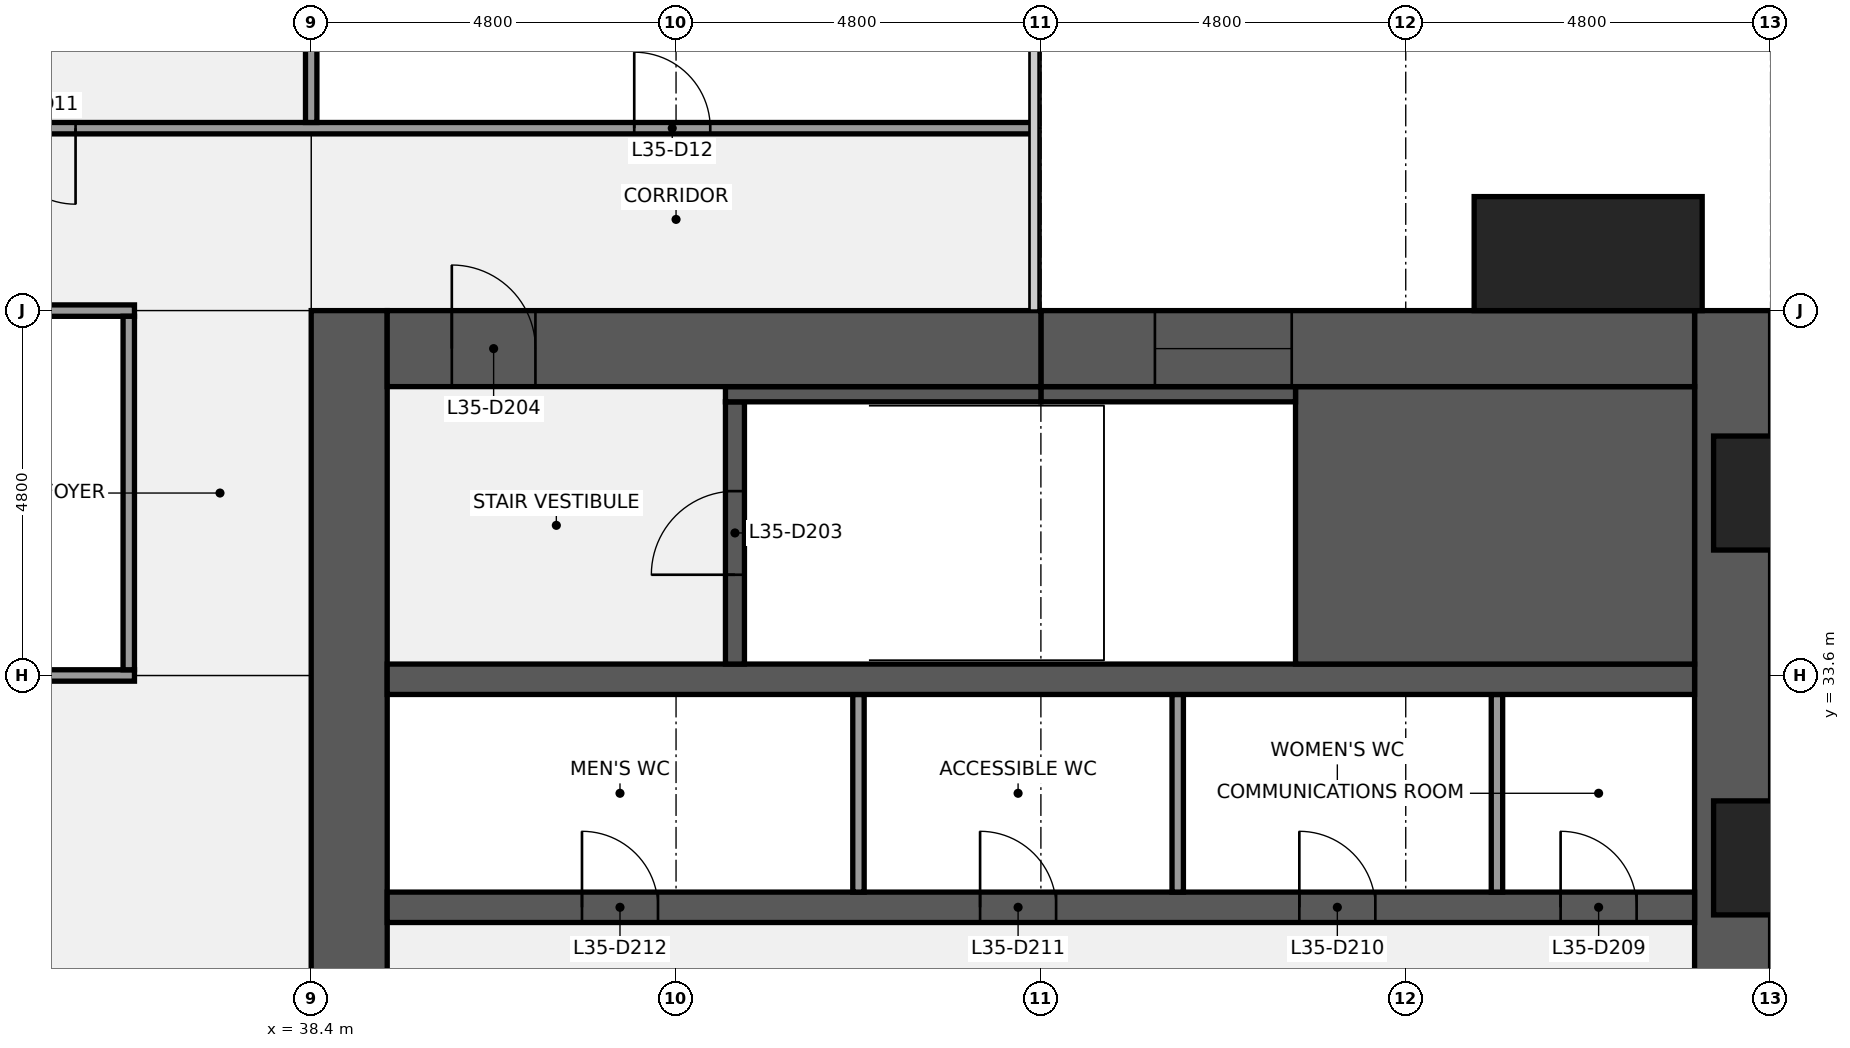
"""IFC4 building model, lengths in metres.
Left out: names, types, materials, properties, quantities, classifications, styles, units other than length and angle.
Written with IfcOpenShell. Run it as: python <this file> out.ifc"""

import sys

from ifc_helpers import new_model, si_unit, direction, frame, frame_2d, origin, origin_2d, place, context, subcontext, project, spatial, rectangle, extrude, element, fill, save


model = new_model("IFC4")
c1 = context("Model", 3, precision=1e-05, world=origin(), true_north=direction((0.0, 1.0)))
c2 = subcontext(c1, "Body", "Model", "MODEL_VIEW")
j1 = project(units=[si_unit("LENGTHUNIT", "METRE"), si_unit("PLANEANGLEUNIT", "RADIAN")], contexts=[c1])
p1 = place(None, origin())
s1 = spatial("IfcSite", under=j1, at=p1, CompositionType="ELEMENT")
p2 = place(p1, origin())
s2 = spatial("IfcBuilding", under=s1, at=p2, CompositionType="ELEMENT")
p3 = place(p2, frame((0.0, 0.0, 160.1)))
s3 = spatial("IfcBuildingStorey", under=s2, at=p3, CompositionType="ELEMENT", Elevation=160.1)
p4 = place(p3, frame((57.1, 38.4, 0.0), z_axis=(0.0, 0.0, 1.0), x_axis=(0.0, -1.0, 0.0)))
e1 = element("IfcWall", 1, at=p4, inside=s3, PredefinedType="SHEAR", context=c2, shape_type="SweptSolid", body=[
    extrude(rectangle(XDim=28.8, YDim=1.0, at=frame_2d((14.4, 0.0))), origin(), (0.0, 0.0, 1.0), 3.84),
])
p5 = place(p4, frame((18.45, 0.0, 0.9)))
e2 = element("IfcOpeningElement", 2, at=p5, cuts=e1, PredefinedType="OPENING", context=c2, shape_type="SweptSolid", body=[
    extrude(rectangle(XDim=1.5, YDim=1.5, at=frame_2d((0.75, 0.75))), frame((0.0, 0.51, 0.0), z_axis=(0.0, -1.0, 0.0), x_axis=(1.0, 0.0, 0.0)), (0.0, 0.0, 1.0), 1.02),
])
p6 = place(p4, frame((8.85, 0.0, 0.9)))
e3 = element("IfcOpeningElement", 3, at=p6, cuts=e1, PredefinedType="OPENING", context=c2, shape_type="SweptSolid", body=[
    extrude(rectangle(XDim=1.5, YDim=1.5, at=frame_2d((0.75, 0.75))), frame((0.0, 0.51, 0.0), z_axis=(0.0, -1.0, 0.0), x_axis=(1.0, 0.0, 0.0)), (0.0, 0.0, 1.0), 1.02),
])
p7 = place(p3, frame((38.9, 9.6, 0.0), z_axis=(0.0, 0.0, 1.0), x_axis=(0.0, 1.0, 0.0)))
e4 = element("IfcWall", 4, at=p7, inside=s3, PredefinedType="SHEAR", context=c2, shape_type="SweptSolid", body=[
    extrude(rectangle(XDim=28.8, YDim=1.0, at=frame_2d((14.4, 0.0))), origin(), (0.0, 0.0, 1.0), 3.84),
])
p8 = place(p7, frame((8.7, 0.0, 0.0)))
e5 = element("IfcOpeningElement", 5, at=p8, cuts=e4, PredefinedType="OPENING", context=c2, shape_type="SweptSolid", body=[
    extrude(rectangle(XDim=1.8, YDim=2.1, at=frame_2d((0.9, 1.05))), frame((0.0, 0.51, 0.0), z_axis=(0.0, -1.0, 0.0), x_axis=(1.0, 0.0, 0.0)), (0.0, 0.0, 1.0), 1.02),
])
p9 = place(p7, frame((18.3, 0.0, 0.0)))
e6 = element("IfcOpeningElement", 6, at=p9, cuts=e4, PredefinedType="OPENING", context=c2, shape_type="SweptSolid", body=[
    extrude(rectangle(XDim=1.8, YDim=2.1, at=frame_2d((0.9, 1.05))), frame((0.0, 0.51, 0.0), z_axis=(0.0, -1.0, 0.0), x_axis=(1.0, 0.0, 0.0)), (0.0, 0.0, 1.0), 1.02),
])
p10 = place(p3, frame((39.4, 30.55, 0.0), z_axis=(0.0, 0.0, 1.0), x_axis=(1.0, 0.0, 0.0)))
e7 = element("IfcWall", 7, at=p10, inside=s3, PredefinedType="SHEAR", context=c2, shape_type="SweptSolid", body=[
    extrude(rectangle(XDim=17.2, YDim=0.4, at=frame_2d((8.6, 0.0))), origin(), (0.0, 0.0, 1.0), 3.84),
])
p11 = place(p10, frame((15.438, 0.0, 0.0)))
e8 = element("IfcOpeningElement", 8, at=p11, cuts=e7, PredefinedType="OPENING", context=c2, shape_type="SweptSolid", body=[
    extrude(rectangle(XDim=1.0, YDim=2.1, at=frame_2d((0.5, 1.05))), frame((0.0, 0.21, 0.0), z_axis=(0.0, -1.0, 0.0), x_axis=(1.0, 0.0, 0.0)), (0.0, 0.0, 1.0), 0.42),
])
p12 = place(p10, frame((12.0, 0.0, 0.0)))
e9 = element("IfcOpeningElement", 9, at=p12, cuts=e7, PredefinedType="OPENING", context=c2, shape_type="SweptSolid", body=[
    extrude(rectangle(XDim=1.0, YDim=2.1, at=frame_2d((0.5, 1.05))), frame((0.0, 0.21, 0.0), z_axis=(0.0, -1.0, 0.0), x_axis=(1.0, 0.0, 0.0)), (0.0, 0.0, 1.0), 0.42),
])
p13 = place(p10, frame((7.8, 0.0, 0.0)))
e10 = element("IfcOpeningElement", 10, at=p13, cuts=e7, PredefinedType="OPENING", context=c2, shape_type="SweptSolid", body=[
    extrude(rectangle(XDim=1.0, YDim=2.1, at=frame_2d((0.5, 1.05))), frame((0.0, 0.21, 0.0), z_axis=(0.0, -1.0, 0.0), x_axis=(1.0, 0.0, 0.0)), (0.0, 0.0, 1.0), 0.42),
])
p14 = place(p10, frame((2.562, 0.0, 0.0)))
e11 = element("IfcOpeningElement", 11, at=p14, cuts=e7, PredefinedType="OPENING", context=c2, shape_type="SweptSolid", body=[
    extrude(rectangle(XDim=1.0, YDim=2.1, at=frame_2d((0.5, 1.05))), frame((0.0, 0.21, 0.0), z_axis=(0.0, -1.0, 0.0), x_axis=(1.0, 0.0, 0.0)), (0.0, 0.0, 1.0), 0.42),
])
for number, where, z_axis, x_axis in (
    (12, (54.0, 30.75, 0.0), (0.0, 0.0, 1.0), (0.0, 1.0, 0.0)),
    (13, (49.8, 30.75, 0.0), (0.0, 0.0, 1.0), (0.0, 1.0, 0.0)),
    (14, (45.6, 30.75, 0.0), (0.0, 0.0, 1.0), (0.0, 1.0, 0.0)),
):
    element("IfcWall", number, at=place(p3, frame(where, z_axis=z_axis, x_axis=x_axis)), inside=s3, PredefinedType="PARTITIONING", context=c2, shape_type="SweptSolid", body=[
        extrude(rectangle(XDim=2.6, YDim=0.15, at=frame_2d((1.3, 0.0))), origin(), (0.0, 0.0, 1.0), 3.84),
    ])
p15 = place(p3, frame((39.4, 33.55, 0.0), z_axis=(0.0, 0.0, 1.0), x_axis=(1.0, 0.0, 0.0)))
e15 = element("IfcWall", 15, at=p15, inside=s3, PredefinedType="SHEAR", context=c2, shape_type="SweptSolid", body=[
    extrude(rectangle(XDim=17.2, YDim=0.4, at=frame_2d((8.6, 0.0))), origin(), (0.0, 0.0, 1.0), 3.84),
])
p16 = place(p3, frame((51.35, 35.575, 0.0), z_axis=(0.0, 0.0, 1.0), x_axis=(1.0, 0.0, 0.0)))
e16 = element("IfcWall", 16, at=p16, inside=s3, PredefinedType="SHEAR", context=c2, shape_type="SweptSolid", body=[
    extrude(rectangle(XDim=5.25, YDim=3.65, at=frame_2d((2.625, 0.0))), origin(), (0.0, 0.0, 1.0), 3.84),
])
p17 = place(p3, frame((43.975, 33.75, 0.0), z_axis=(0.0, 0.0, 1.0), x_axis=(0.0, 1.0, 0.0)))
e17 = element("IfcWall", 17, at=p17, inside=s3, PredefinedType="SHEAR", context=c2, shape_type="SweptSolid", body=[
    extrude(rectangle(XDim=3.45, YDim=0.25, at=frame_2d((1.725, 0.0))), origin(), (0.0, 0.0, 1.0), 3.84),
])
p18 = place(p17, frame((1.175, 0.0, 0.0)))
e18 = element("IfcOpeningElement", 18, at=p18, cuts=e17, PredefinedType="OPENING", context=c2, shape_type="SweptSolid", body=[
    extrude(rectangle(XDim=1.1, YDim=2.1, at=frame_2d((0.55, 1.05))), frame((0.0, 0.135, 0.0), z_axis=(0.0, -1.0, 0.0), x_axis=(1.0, 0.0, 0.0)), (0.0, 0.0, 1.0), 0.27),
])
p19 = place(p3, frame((48.0, 37.3, 0.0), z_axis=(0.0, 0.0, 1.0), x_axis=(1.0, 0.0, 0.0)))
e19 = element("IfcWall", 19, at=p19, inside=s3, PredefinedType="SHEAR", context=c2, shape_type="SweptSolid", body=[
    extrude(rectangle(XDim=3.35, YDim=0.2, at=frame_2d((1.675, 0.0))), origin(), (0.0, 0.0, 1.0), 3.84),
])
p20 = place(p3, frame((43.85, 37.3, 0.0), z_axis=(0.0, 0.0, 1.0), x_axis=(1.0, 0.0, 0.0)))
e20 = element("IfcWall", 20, at=p20, inside=s3, PredefinedType="SHEAR", context=c2, shape_type="SweptSolid", body=[
    extrude(rectangle(XDim=4.15, YDim=0.2, at=frame_2d((2.075, 0.0))), origin(), (0.0, 0.0, 1.0), 3.84),
])
p21 = place(p3, frame((48.0, 37.9, 0.0), z_axis=(0.0, 0.0, 1.0), x_axis=(1.0, 0.0, 0.0)))
e21 = element("IfcWall", 21, at=p21, inside=s3, PredefinedType="SHEAR", context=c2, shape_type="SweptSolid", body=[
    extrude(rectangle(XDim=8.6, YDim=1.0, at=frame_2d((4.3, 0.0))), origin(), (0.0, 0.0, 1.0), 3.84),
])
p22 = place(p21, frame((1.5, 0.0, 0.9)))
e22 = element("IfcOpeningElement", 22, at=p22, cuts=e21, PredefinedType="OPENING", context=c2, shape_type="SweptSolid", body=[
    extrude(rectangle(XDim=1.8, YDim=1.5, at=frame_2d((0.9, 0.75))), frame((0.0, 0.51, 0.0), z_axis=(0.0, -1.0, 0.0), x_axis=(1.0, 0.0, 0.0)), (0.0, 0.0, 1.0), 1.02),
])
p23 = place(p3, frame((39.4, 37.9, 0.0), z_axis=(0.0, 0.0, 1.0), x_axis=(1.0, 0.0, 0.0)))
e23 = element("IfcWall", 23, at=p23, inside=s3, PredefinedType="SHEAR", context=c2, shape_type="SweptSolid", body=[
    extrude(rectangle(XDim=8.6, YDim=1.0, at=frame_2d((4.3, 0.0))), origin(), (0.0, 0.0, 1.0), 3.84),
])
p24 = place(p23, frame((0.85, 0.0, 0.0)))
e24 = element("IfcOpeningElement", 24, at=p24, cuts=e23, PredefinedType="OPENING", context=c2, shape_type="SweptSolid", body=[
    extrude(rectangle(XDim=1.1, YDim=2.1, at=frame_2d((0.55, 1.05))), frame((0.0, 0.51, 0.0), z_axis=(0.0, -1.0, 0.0), x_axis=(1.0, 0.0, 0.0)), (0.0, 0.0, 1.0), 1.02),
])
p25 = place(p3, frame((31.275, 33.6, 0.0), z_axis=(0.0, 0.0, 1.0), x_axis=(1.0, 0.0, 0.0)))
e25 = element("IfcWall", 25, at=p25, inside=s3, PredefinedType="PARTITIONING", context=c2, shape_type="SweptSolid", body=[
    extrude(rectangle(XDim=4.8, YDim=0.15, at=frame_2d((2.4, 0.0))), origin(), (0.0, 0.0, 1.0), 2.849),
])
p26 = place(p3, frame((21.525, 38.4, 0.0), z_axis=(0.0, 0.0, 1.0), x_axis=(1.0, 0.0, 0.0)))
e26 = element("IfcWall", 26, at=p26, inside=s3, PredefinedType="PARTITIONING", context=c2, shape_type="SweptSolid", body=[
    extrude(rectangle(XDim=14.55, YDim=0.15, at=frame_2d((7.275, 0.0))), origin(), (0.0, 0.0, 1.0), 2.849),
])
p27 = place(p26, frame((6.775, 0.0, 0.0)))
e27 = element("IfcOpeningElement", 27, at=p27, cuts=e26, PredefinedType="OPENING", context=c2, shape_type="SweptSolid", body=[
    extrude(rectangle(XDim=1.0, YDim=2.1, at=frame_2d((0.5, 1.05))), frame((0.0, 0.085, 0.0), z_axis=(0.0, -1.0, 0.0), x_axis=(1.0, 0.0, 0.0)), (0.0, 0.0, 1.0), 0.17),
])
p28 = place(p3, frame((9.525, 40.8, 0.0), z_axis=(0.0, 0.0, 1.0), x_axis=(1.0, 0.0, 0.0)))
e28 = element("IfcWall", 28, at=p28, inside=s3, PredefinedType="PARTITIONING", context=c2, shape_type="SweptSolid", body=[
    extrude(rectangle(XDim=38.375, YDim=0.15, at=frame_2d((19.188, 0.0))), origin(), (0.0, 0.0, 1.0), 2.849),
])
p29 = place(p28, frame((4.375, 0.0, 0.0)))
e29 = element("IfcOpeningElement", 29, at=p29, cuts=e28, PredefinedType="OPENING", context=c2, shape_type="SweptSolid", body=[
    extrude(rectangle(XDim=1.0, YDim=2.1, at=frame_2d((0.5, 1.05))), frame((0.0, 0.085, 0.0), z_axis=(0.0, -1.0, 0.0), x_axis=(1.0, 0.0, 0.0)), (0.0, 0.0, 1.0), 0.17),
])
p30 = place(p28, frame((13.975, 0.0, 0.0)))
e30 = element("IfcOpeningElement", 30, at=p30, cuts=e28, PredefinedType="OPENING", context=c2, shape_type="SweptSolid", body=[
    extrude(rectangle(XDim=1.0, YDim=2.1, at=frame_2d((0.5, 1.05))), frame((0.0, 0.085, 0.0), z_axis=(0.0, -1.0, 0.0), x_axis=(1.0, 0.0, 0.0)), (0.0, 0.0, 1.0), 0.17),
])
p31 = place(p28, frame((19.975, 0.0, 0.0)))
e31 = element("IfcOpeningElement", 31, at=p31, cuts=e28, PredefinedType="OPENING", context=c2, shape_type="SweptSolid", body=[
    extrude(rectangle(XDim=1.0, YDim=2.1, at=frame_2d((0.5, 1.05))), frame((0.0, 0.085, 0.0), z_axis=(0.0, -1.0, 0.0), x_axis=(1.0, 0.0, 0.0)), (0.0, 0.0, 1.0), 0.17),
])
p32 = place(p28, frame((24.775, 0.0, 0.0)))
e32 = element("IfcOpeningElement", 32, at=p32, cuts=e28, PredefinedType="OPENING", context=c2, shape_type="SweptSolid", body=[
    extrude(rectangle(XDim=1.0, YDim=2.1, at=frame_2d((0.5, 1.05))), frame((0.0, 0.085, 0.0), z_axis=(0.0, -1.0, 0.0), x_axis=(1.0, 0.0, 0.0)), (0.0, 0.0, 1.0), 0.17),
])
p33 = place(p28, frame((33.125, 0.0, 0.0)))
e33 = element("IfcOpeningElement", 33, at=p33, cuts=e28, PredefinedType="OPENING", context=c2, shape_type="SweptSolid", body=[
    extrude(rectangle(XDim=1.0, YDim=2.1, at=frame_2d((0.5, 1.05))), frame((0.0, 0.085, 0.0), z_axis=(0.0, -1.0, 0.0), x_axis=(1.0, 0.0, 0.0)), (0.0, 0.0, 1.0), 0.17),
])
p34 = place(p3, frame((36.0, 33.675, 0.0), z_axis=(0.0, 0.0, 1.0), x_axis=(0.0, 1.0, 0.0)))
e34 = element("IfcWall", 34, at=p34, inside=s3, PredefinedType="PARTITIONING", context=c2, shape_type="SweptSolid", body=[
    extrude(rectangle(XDim=4.65, YDim=0.15, at=frame_2d((2.325, 0.0))), origin(), (0.0, 0.0, 1.0), 2.849),
])
p35 = place(p3, frame((38.4, 40.875, 0.0), z_axis=(0.0, 0.0, 1.0), x_axis=(0.0, 1.0, 0.0)))
e35 = element("IfcWall", 35, at=p35, inside=s3, PredefinedType="PARTITIONING", context=c2, shape_type="SweptSolid", body=[
    extrude(rectangle(XDim=3.45, YDim=0.15, at=frame_2d((1.725, 0.0))), origin(), (0.0, 0.0, 1.0), 2.849),
])
p36 = place(p3, frame((55.2, 39.15, 0.0), z_axis=(0.0, 0.0, 1.0), x_axis=(1.0, 0.0, 0.0)))
e36 = element("IfcColumn", 36, at=p36, inside=s3, PredefinedType="PILASTER", context=c2, shape_type="SweptSolid", body=[
    extrude(rectangle(XDim=3.0, YDim=1.5, at=origin_2d()), origin(), (0.0, 0.0, 1.0), 4.0),
])
p37 = place(p18, origin())
e37 = element("IfcDoor", 37, at=p37, inside=s3, OperationType="SINGLE_SWING_LEFT", PredefinedType="DOOR", context=c2, shape_type="SweptSolid", body=[
    extrude(rectangle(XDim=1.1, YDim=2.1, at=frame_2d((0.55, 1.05))), frame((0.0, 0.025, 0.0), z_axis=(0.0, -1.0, 0.0), x_axis=(1.0, 0.0, 0.0)), (0.0, 0.0, 1.0), 0.05),
])
fill(e18, e37)
p38 = place(p24, origin())
e38 = element("IfcDoor", 38, at=p38, inside=s3, OperationType="SINGLE_SWING_LEFT", PredefinedType="DOOR", context=c2, shape_type="SweptSolid", body=[
    extrude(rectangle(XDim=1.1, YDim=2.1, at=frame_2d((0.55, 1.05))), frame((0.0, 0.025, 0.0), z_axis=(0.0, -1.0, 0.0), x_axis=(1.0, 0.0, 0.0)), (0.0, 0.0, 1.0), 0.05),
])
fill(e24, e38)
p39 = place(p11, origin())
e39 = element("IfcDoor", 39, at=p39, inside=s3, OperationType="SINGLE_SWING_LEFT", PredefinedType="DOOR", context=c2, shape_type="SweptSolid", body=[
    extrude(rectangle(XDim=1.0, YDim=2.1, at=frame_2d((0.5, 1.05))), frame((0.0, 0.025, 0.0), z_axis=(0.0, -1.0, 0.0), x_axis=(1.0, 0.0, 0.0)), (0.0, 0.0, 1.0), 0.05),
])
fill(e8, e39)
p40 = place(p12, origin())
e40 = element("IfcDoor", 40, at=p40, inside=s3, OperationType="SINGLE_SWING_LEFT", PredefinedType="DOOR", context=c2, shape_type="SweptSolid", body=[
    extrude(rectangle(XDim=1.0, YDim=2.1, at=frame_2d((0.5, 1.05))), frame((0.0, 0.025, 0.0), z_axis=(0.0, -1.0, 0.0), x_axis=(1.0, 0.0, 0.0)), (0.0, 0.0, 1.0), 0.05),
])
fill(e9, e40)
p41 = place(p13, origin())
e41 = element("IfcDoor", 41, at=p41, inside=s3, OperationType="SINGLE_SWING_LEFT", PredefinedType="DOOR", context=c2, shape_type="SweptSolid", body=[
    extrude(rectangle(XDim=1.0, YDim=2.1, at=frame_2d((0.5, 1.05))), frame((0.0, 0.025, 0.0), z_axis=(0.0, -1.0, 0.0), x_axis=(1.0, 0.0, 0.0)), (0.0, 0.0, 1.0), 0.05),
])
fill(e10, e41)
p42 = place(p14, origin())
e42 = element("IfcDoor", 42, at=p42, inside=s3, OperationType="SINGLE_SWING_LEFT", PredefinedType="DOOR", context=c2, shape_type="SweptSolid", body=[
    extrude(rectangle(XDim=1.0, YDim=2.1, at=frame_2d((0.5, 1.05))), frame((0.0, 0.025, 0.0), z_axis=(0.0, -1.0, 0.0), x_axis=(1.0, 0.0, 0.0)), (0.0, 0.0, 1.0), 0.05),
])
fill(e11, e42)
p43 = place(p22, origin())
e43 = element("IfcWindow", 43, at=p43, inside=s3, PartitioningType="SINGLE_PANEL", PredefinedType="WINDOW", context=c2, shape_type="SweptSolid", body=[
    extrude(rectangle(XDim=1.8, YDim=1.5, at=frame_2d((0.9, 0.75))), frame((0.0, 0.03, 0.0), z_axis=(0.0, -1.0, 0.0), x_axis=(1.0, 0.0, 0.0)), (0.0, 0.0, 1.0), 0.06),
])
fill(e22, e43)
p44 = place(p32, origin())
e44 = element("IfcDoor", 44, at=p44, inside=s3, OperationType="SINGLE_SWING_RIGHT", PredefinedType="DOOR", context=c2, shape_type="SweptSolid", body=[
    extrude(rectangle(XDim=1.0, YDim=2.1, at=frame_2d((0.5, 1.05))), frame((0.0, 0.025, 0.0), z_axis=(0.0, -1.0, 0.0), x_axis=(1.0, 0.0, 0.0)), (0.0, 0.0, 1.0), 0.05),
])
fill(e32, e44)
p45 = place(p33, origin())
e45 = element("IfcDoor", 45, at=p45, inside=s3, OperationType="SINGLE_SWING_LEFT", PredefinedType="DOOR", context=c2, shape_type="SweptSolid", body=[
    extrude(rectangle(XDim=1.0, YDim=2.1, at=frame_2d((0.5, 1.05))), frame((0.0, 0.025, 0.0), z_axis=(0.0, -1.0, 0.0), x_axis=(1.0, 0.0, 0.0)), (0.0, 0.0, 1.0), 0.05),
])
fill(e33, e45)
save(model, sys.argv[1])
